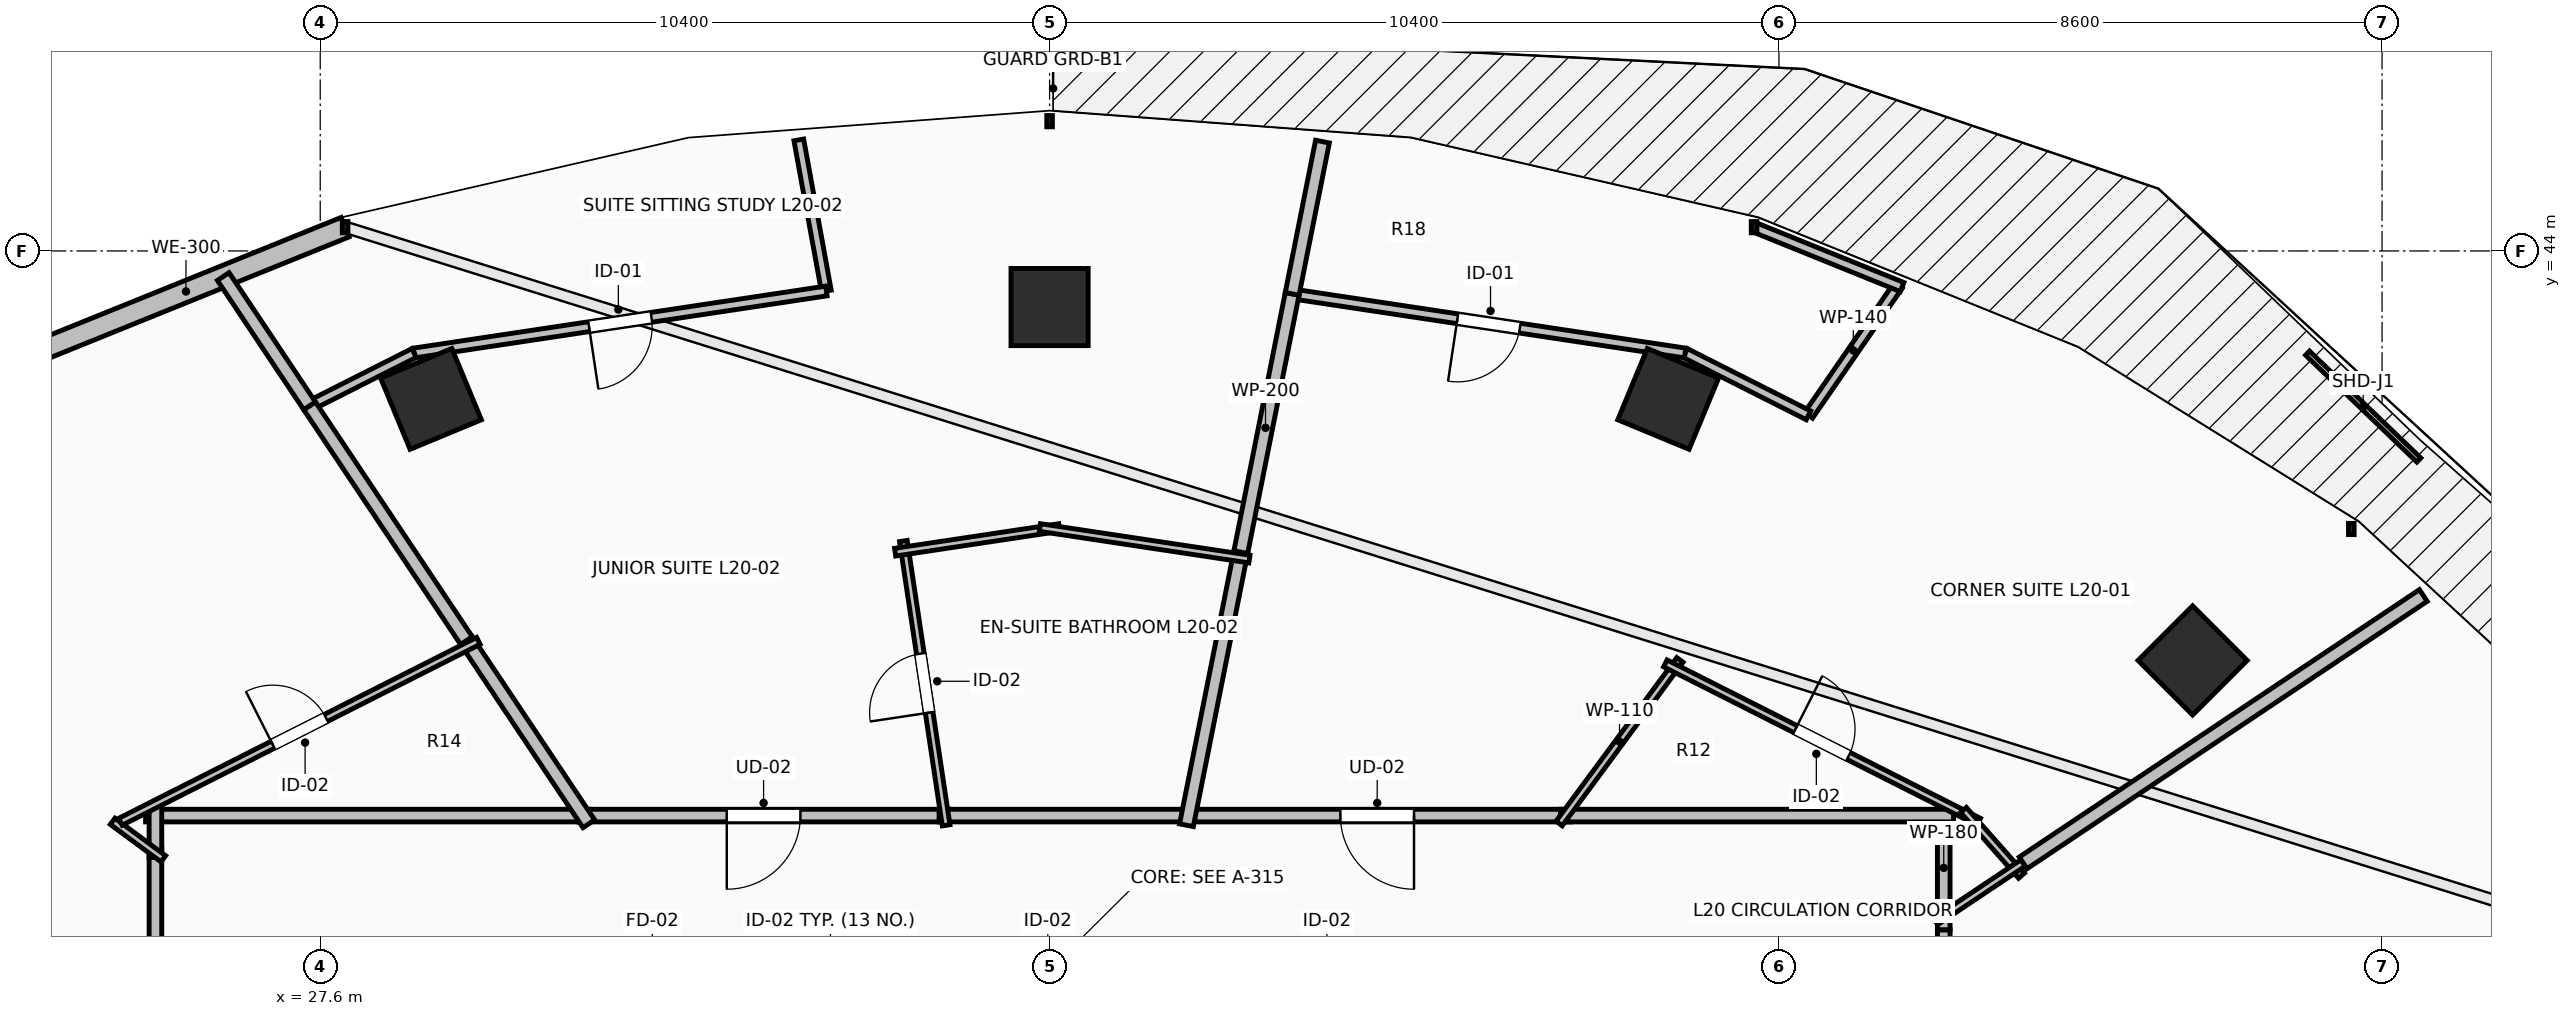
"""IFC4 building model, lengths in metres.
Left out: names, types, materials, properties, quantities, classifications, styles, units other than length and angle.
Written with IfcOpenShell. Run it as: python <this file> out.ifc"""

import sys

from ifc_helpers import new_model, si_unit, direction, frame, frame_2d, origin, origin_2d, place, context, subcontext, project, spatial, rectangle, extrude, element, fill, save


model = new_model("IFC4")
c1 = context("Model", 3, precision=1e-05, world=origin(), true_north=direction((0.0, 1.0)))
c2 = subcontext(c1, "Body", "Model", "MODEL_VIEW")
j1 = project(units=[si_unit("LENGTHUNIT", "METRE"), si_unit("PLANEANGLEUNIT", "RADIAN")], contexts=[c1])
p1 = place(None, origin())
s1 = spatial("IfcSite", under=j1, at=p1, CompositionType="ELEMENT")
p2 = place(p1, origin())
s2 = spatial("IfcBuilding", under=s1, at=p2, CompositionType="ELEMENT")
p3 = place(p2, frame((0.0, 0.0, 78.8)))
s3 = spatial("IfcBuildingStorey", under=s2, at=p3, CompositionType="ELEMENT", Elevation=78.8)
for number, where, z_axis, x_axis in (
    (1, (54.299, 38.162, 0.0), (0.0, 0.0, 1.0), (0.707, 0.707, 0.0)),
    (2, (46.821, 41.891, 0.0), (0.0, 0.0, 1.0), (0.383, 0.924, 0.0)),
    (3, (38.0, 43.2, 0.0), (0.0, 0.0, 1.0), (0.0, 1.0, 0.0)),
    (4, (29.179, 41.891, 0.0), (0.0, 0.0, 1.0), (-0.383, 0.924, 0.0)),
):
    element("IfcColumn", number, at=place(p3, frame(where, z_axis=z_axis, x_axis=x_axis)), inside=s3, PredefinedType="COLUMN", context=c2, shape_type="SweptSolid", body=[
        extrude(rectangle(XDim=1.1, YDim=1.1, at=origin_2d()), origin(), (0.0, 0.0, 1.0), 3.5),
    ])
p4 = place(p3, frame((27.955, 44.339, 0.0), z_axis=(0.0, 0.0, 1.0), x_axis=(-0.927122233109, -0.374759075775, 0.0)))
e5 = element("IfcWall", 5, at=p4, inside=s3, PredefinedType="STANDARD", context=c2, shape_type="SweptSolid", body=[
    extrude(rectangle(XDim=4.895, YDim=0.3, at=frame_2d((2.448, 0.0))), origin(), (0.0, 0.0, 1.0), 3.24),
])
p5 = place(p3, frame((45.424, 35.95, 0.0), z_axis=(0.0, 0.0, 1.0), x_axis=(-1.0, 0.0, 0.0)))
e6 = element("IfcWall", 6, at=p5, inside=s3, PredefinedType="PARTITIONING", context=c2, shape_type="SweptSolid", body=[
    extrude(rectangle(XDim=5.505, YDim=0.18, at=frame_2d((2.752, 0.0))), origin(), (0.0, 0.0, 1.0), 2.922),
])
p6 = place(p5, frame((2.228, 0.0, 0.0)))
e7 = element("IfcOpeningElement", 7, at=p6, cuts=e6, PredefinedType="OPENING", context=c2, shape_type="SweptSolid", body=[
    extrude(rectangle(XDim=1.05, YDim=2.2, at=frame_2d((0.525, 1.1))), frame((0.0, 0.105, 0.0), z_axis=(0.0, -1.0, 0.0), x_axis=(1.0, 0.0, 0.0)), (0.0, 0.0, 1.0), 0.21),
])
p7 = place(p3, frame((50.75, 34.319, 0.0), z_axis=(0.0, 0.0, 1.0), x_axis=(0.0, 1.0, 0.0)))
e8 = element("IfcWall", 8, at=p7, inside=s3, PredefinedType="PARTITIONING", context=c2, shape_type="SweptSolid", body=[
    extrude(rectangle(XDim=1.771, YDim=0.18, at=frame_2d((0.885, 0.0))), origin(), (0.0, 0.0, 1.0), 2.432),
])
p8 = place(p3, frame((50.89, 35.95, 0.0), z_axis=(0.0, 0.0, 1.0), x_axis=(-1.0, 0.0, 0.0)))
e9 = element("IfcWall", 9, at=p8, inside=s3, PredefinedType="PARTITIONING", context=c2, shape_type="SweptSolid", body=[
    extrude(rectangle(XDim=5.606, YDim=0.18, at=frame_2d((2.803, 0.0))), origin(), (0.0, 0.0, 1.0), 2.432),
])
p9 = place(p3, frame((36.564, 35.95, 0.0), z_axis=(0.0, 0.0, 1.0), x_axis=(-1.0, 0.0, 0.0)))
e10 = element("IfcWall", 10, at=p9, inside=s3, PredefinedType="PARTITIONING", context=c2, shape_type="SweptSolid", body=[
    extrude(rectangle(XDim=5.284, YDim=0.18, at=frame_2d((2.642, 0.0))), origin(), (0.0, 0.0, 1.0), 3.24),
])
p10 = place(p9, frame((2.117, 0.0, 0.0)))
e11 = element("IfcOpeningElement", 11, at=p10, cuts=e10, PredefinedType="OPENING", context=c2, shape_type="SweptSolid", body=[
    extrude(rectangle(XDim=1.05, YDim=2.2, at=frame_2d((0.525, 1.1))), frame((0.0, 0.105, 0.0), z_axis=(0.0, -1.0, 0.0), x_axis=(1.0, 0.0, 0.0)), (0.0, 0.0, 1.0), 0.21),
])
p11 = place(p3, frame((40.059, 35.95, 0.0), z_axis=(0.0, 0.0, 1.0), x_axis=(-1.0, 0.0, 0.0)))
e12 = element("IfcWall", 12, at=p11, inside=s3, PredefinedType="PARTITIONING", context=c2, shape_type="SweptSolid", body=[
    extrude(rectangle(XDim=3.635, YDim=0.18, at=frame_2d((1.817, 0.0))), origin(), (0.0, 0.0, 1.0), 3.24),
])
p12 = place(p3, frame((25.25, 35.492, 0.0), z_axis=(0.0, 0.0, 1.0), x_axis=(0.0, -1.0, 0.0)))
e13 = element("IfcWall", 13, at=p12, inside=s3, PredefinedType="PARTITIONING", context=c2, shape_type="SweptSolid", body=[
    extrude(rectangle(XDim=7.016, YDim=0.18, at=frame_2d((3.508, 0.0))), origin(), (0.0, 0.0, 1.0), 2.432),
])
p13 = place(p12, frame((2.983, 0.0, 0.0)))
e14 = element("IfcOpeningElement", 14, at=p13, cuts=e13, PredefinedType="OPENING", context=c2, shape_type="SweptSolid", body=[
    extrude(rectangle(XDim=1.05, YDim=2.2, at=frame_2d((0.525, 1.1))), frame((0.0, 0.105, 0.0), z_axis=(0.0, -1.0, 0.0), x_axis=(1.0, 0.0, 0.0)), (0.0, 0.0, 1.0), 0.21),
])
p14 = place(p3, frame((31.42, 35.95, 0.0), z_axis=(0.0, 0.0, 1.0), x_axis=(-1.0, 0.0, 0.0)))
e15 = element("IfcWall", 15, at=p14, inside=s3, PredefinedType="PARTITIONING", context=c2, shape_type="SweptSolid", body=[
    extrude(rectangle(XDim=6.31, YDim=0.18, at=frame_2d((3.155, 0.0))), origin(), (0.0, 0.0, 1.0), 2.432),
])
p15 = place(p3, frame((25.25, 36.09, 0.0), z_axis=(0.0, 0.0, 1.0), x_axis=(0.0, -1.0, 0.0)))
e16 = element("IfcWall", 16, at=p15, inside=s3, PredefinedType="PARTITIONING", context=c2, shape_type="SweptSolid", body=[
    extrude(rectangle(XDim=0.738, YDim=0.18, at=frame_2d((0.369, 0.0))), origin(), (0.0, 0.0, 1.0), 3.24),
])
p16 = place(p3, frame((50.75, 20.779, 0.0), z_axis=(0.0, 0.0, 1.0), x_axis=(0.0, 1.0, 0.0)))
e17 = element("IfcWall", 17, at=p16, inside=s3, PredefinedType="PARTITIONING", context=c2, shape_type="SweptSolid", body=[
    extrude(rectangle(XDim=13.54, YDim=0.18, at=frame_2d((6.77, 0.0))), origin(), (0.0, 0.0, 1.0), 2.432),
])
p17 = place(p16, frame((6.27, 0.0, 0.0)))
e18 = element("IfcOpeningElement", 18, at=p17, cuts=e17, PredefinedType="OPENING", context=c2, shape_type="SweptSolid", body=[
    extrude(rectangle(XDim=1.0, YDim=2.15, at=frame_2d((0.5, 1.075))), frame((0.0, 0.105, 0.0), z_axis=(0.0, -1.0, 0.0), x_axis=(1.0, 0.0, 0.0)), (0.0, 0.0, 1.0), 0.21),
])
p18 = place(p3, frame((45.266, 35.837, 0.0), z_axis=(0.0, 0.0, 1.0), x_axis=(0.594069015324, 0.804414075605, 0.0)))
e19 = element("IfcWall", 19, at=p18, inside=s3, PredefinedType="PARTITIONING", context=c2, shape_type="SweptSolid", body=[
    extrude(rectangle(XDim=2.899, YDim=0.11, at=frame_2d((1.45, 0.0))), origin(), (0.0, 0.0, 1.0), 2.922),
])
p19 = place(p3, frame((46.78, 38.12, 0.0), z_axis=(0.0, 0.0, 1.0), x_axis=(0.892517538434, -0.451012686726, 0.0)))
e20 = element("IfcWall", 20, at=p19, inside=s3, PredefinedType="PARTITIONING", context=c2, shape_type="SweptSolid", body=[
    extrude(rectangle(XDim=5.007, YDim=0.11, at=frame_2d((2.503, 0.0))), origin(), (0.0, 0.0, 1.0), 2.432),
])
p20 = place(p19, frame((2.079, 0.0, 0.0)))
e21 = element("IfcOpeningElement", 21, at=p20, cuts=e20, PredefinedType="OPENING", context=c2, shape_type="SweptSolid", body=[
    extrude(rectangle(XDim=0.85, YDim=2.1, at=frame_2d((0.425, 1.05))), frame((0.0, 0.07, 0.0), z_axis=(0.0, -1.0, 0.0), x_axis=(1.0, 0.0, 0.0)), (0.0, 0.0, 1.0), 0.14),
])
p21 = place(p3, frame((51.031, 36.03, 0.0), z_axis=(0.0, 0.0, 1.0), x_axis=(0.661996266618, -0.749507133377, 0.0)))
e22 = element("IfcWall", 22, at=p21, inside=s3, PredefinedType="PARTITIONING", context=c2, shape_type="SweptSolid", body=[
    extrude(rectangle(XDim=1.25, YDim=0.11, at=frame_2d((0.625, 0.0))), origin(), (0.0, 0.0, 1.0), 2.432),
])
p22 = place(p3, frame((51.882, 35.276, 0.0), z_axis=(0.0, 0.0, 1.0), x_axis=(-0.831374526136, -0.555712513169, 0.0)))
e23 = element("IfcWall", 23, at=p22, inside=s3, PredefinedType="PARTITIONING", context=c2, shape_type="SweptSolid", body=[
    extrude(rectangle(XDim=1.502, YDim=0.11, at=frame_2d((0.751, 0.0))), origin(), (0.0, 0.0, 1.0), 2.922),
])
p23 = place(p3, frame((50.1, 43.507, 0.0), z_axis=(0.0, 0.0, 1.0), x_axis=(-0.568470595976, -0.822703580587, 0.0)))
e24 = element("IfcWall", 24, at=p23, inside=s3, PredefinedType="PARTITIONING", context=c2, shape_type="SweptSolid", body=[
    extrude(rectangle(XDim=2.25, YDim=0.14, at=frame_2d((1.125, 0.0))), origin(), (0.0, 0.0, 1.0), 3.24),
])
p24 = place(p3, frame((48.821, 41.656, 0.0), z_axis=(0.0, 0.0, 1.0), x_axis=(-0.892511395612, 0.451024842668, 0.0)))
e25 = element("IfcWall", 25, at=p24, inside=s3, PredefinedType="PARTITIONING", context=c2, shape_type="SweptSolid", body=[
    extrude(rectangle(XDim=1.971, YDim=0.14, at=frame_2d((0.985, 0.0))), origin(), (0.0, 0.0, 1.0), 3.24),
])
p25 = place(p3, frame((47.062, 42.545, 0.0), z_axis=(0.0, 0.0, 1.0), x_axis=(-0.988869883596, 0.148782906669, 0.0)))
e26 = element("IfcWall", 26, at=p25, inside=s3, PredefinedType="PARTITIONING", context=c2, shape_type="SweptSolid", body=[
    extrude(rectangle(XDim=5.666, YDim=0.14, at=frame_2d((2.833, 0.0))), origin(), (0.0, 0.0, 1.0), 3.24),
])
p26 = place(p25, frame((2.383, 0.0, 0.0)))
e27 = element("IfcOpeningElement", 27, at=p26, cuts=e26, PredefinedType="OPENING", context=c2, shape_type="SweptSolid", body=[
    extrude(rectangle(XDim=0.9, YDim=2.1, at=frame_2d((0.45, 1.05))), frame((0.0, 0.085, 0.0), z_axis=(0.0, -1.0, 0.0), x_axis=(1.0, 0.0, 0.0)), (0.0, 0.0, 1.0), 0.17),
])
p27 = place(p3, frame((50.156, 43.485, 0.0), z_axis=(0.0, 0.0, 1.0), x_axis=(-0.926988791776, 0.375089029327, 0.0)))
e28 = element("IfcWall", 28, at=p27, inside=s3, PredefinedType="PARTITIONING", context=c2, shape_type="SweptSolid", body=[
    extrude(rectangle(XDim=2.263, YDim=0.14, at=frame_2d((1.132, 0.0))), origin(), (0.0, 0.0, 1.0), 3.24),
])
p28 = place(p3, frame((41.459, 43.388, 0.0), z_axis=(0.0, 0.0, 1.0), x_axis=(-0.195187593062, -0.980765926975, 0.0)))
e29 = element("IfcWall", 29, at=p28, inside=s3, PredefinedType="PARTITIONING", context=c2, shape_type="SweptSolid", body=[
    extrude(rectangle(XDim=3.894, YDim=0.2, at=frame_2d((1.947, 0.0))), origin(), (0.0, 0.0, 1.0), 2.677),
])
p29 = place(p3, frame((40.727, 39.706, 0.0), z_axis=(0.0, 0.0, 1.0), x_axis=(-0.195252736913, -0.980752960091, 0.0)))
e30 = element("IfcWall", 30, at=p29, inside=s3, PredefinedType="PARTITIONING", context=c2, shape_type="SweptSolid", body=[
    extrude(rectangle(XDim=3.97, YDim=0.2, at=frame_2d((1.985, 0.0))), origin(), (0.0, 0.0, 1.0), 2.874),
])
p30 = place(p3, frame((51.883, 35.276, 0.0), z_axis=(0.0, 0.0, 1.0), x_axis=(0.831464132421, 0.555578434154, 0.0)))
e31 = element("IfcWall", 31, at=p30, inside=s3, PredefinedType="PARTITIONING", context=c2, shape_type="SweptSolid", body=[
    extrude(rectangle(XDim=6.862, YDim=0.2, at=frame_2d((3.431, 0.0))), origin(), (0.0, 0.0, 1.0), 2.677),
])
p31 = place(p3, frame((41.891, 45.559, 0.0), z_axis=(0.0, 0.0, 1.0), x_axis=(-0.195204079936, -0.980762645688, 0.0)))
e32 = element("IfcWall", 32, at=p31, inside=s3, PredefinedType="PARTITIONING", context=c2, shape_type="SweptSolid", body=[
    extrude(rectangle(XDim=2.214, YDim=0.2, at=frame_2d((1.107, 0.0))), origin(), (0.0, 0.0, 1.0), 3.24),
])
p32 = place(p3, frame((36.525, 35.812, 0.0), z_axis=(0.0, 0.0, 1.0), x_axis=(-0.148739497936, 0.988876413792, 0.0)))
e33 = element("IfcWall", 33, at=p32, inside=s3, PredefinedType="PARTITIONING", context=c2, shape_type="SweptSolid", body=[
    extrude(rectangle(XDim=4.099, YDim=0.11, at=frame_2d((2.049, 0.0))), origin(), (0.0, 0.0, 1.0), 2.874),
])
p33 = place(p32, frame((1.624, 0.0, 0.0)))
e34 = element("IfcOpeningElement", 34, at=p33, cuts=e33, PredefinedType="OPENING", context=c2, shape_type="SweptSolid", body=[
    extrude(rectangle(XDim=0.85, YDim=2.1, at=frame_2d((0.425, 1.05))), frame((0.0, 0.07, 0.0), z_axis=(0.0, -1.0, 0.0), x_axis=(1.0, 0.0, 0.0)), (0.0, 0.0, 1.0), 0.14),
])
p34 = place(p3, frame((35.798, 39.705, 0.0), z_axis=(0.0, 0.0, 1.0), x_axis=(0.988893947493, 0.148622880511, 0.0)))
e35 = element("IfcWall", 35, at=p34, inside=s3, PredefinedType="PARTITIONING", context=c2, shape_type="SweptSolid", body=[
    extrude(rectangle(XDim=2.367, YDim=0.11, at=frame_2d((1.184, 0.0))), origin(), (0.0, 0.0, 1.0), 2.874),
])
p35 = place(p3, frame((37.862, 40.057, 0.0), z_axis=(0.0, 0.0, 1.0), x_axis=(0.988861549405, -0.148838288446, 0.0)))
e36 = element("IfcWall", 36, at=p35, inside=s3, PredefinedType="PARTITIONING", context=c2, shape_type="SweptSolid", body=[
    extrude(rectangle(XDim=3.021, YDim=0.11, at=frame_2d((1.511, 0.0))), origin(), (0.0, 0.0, 1.0), 3.24),
])
p36 = place(p3, frame((34.424, 45.583, 0.0), z_axis=(0.0, 0.0, 1.0), x_axis=(0.179405454878, -0.983775219631, 0.0)))
e37 = element("IfcWall", 37, at=p36, inside=s3, PredefinedType="PARTITIONING", context=c2, shape_type="SweptSolid", body=[
    extrude(rectangle(XDim=2.19, YDim=0.14, at=frame_2d((1.095, 0.0))), origin(), (0.0, 0.0, 1.0), 3.24),
])
p37 = place(p3, frame((34.817, 43.429, 0.0), z_axis=(0.0, 0.0, 1.0), x_axis=(-0.988882066939, -0.14870190882, 0.0)))
e38 = element("IfcWall", 38, at=p37, inside=s3, PredefinedType="PARTITIONING", context=c2, shape_type="SweptSolid", body=[
    extrude(rectangle(XDim=5.945, YDim=0.14, at=frame_2d((2.973, 0.0))), origin(), (0.0, 0.0, 1.0), 3.24),
])
p38 = place(p37, frame((2.522, 0.0, 0.0)))
e39 = element("IfcOpeningElement", 39, at=p38, cuts=e38, PredefinedType="OPENING", context=c2, shape_type="SweptSolid", body=[
    extrude(rectangle(XDim=0.9, YDim=2.1, at=frame_2d((0.45, 1.05))), frame((0.0, 0.085, 0.0), z_axis=(0.0, -1.0, 0.0), x_axis=(1.0, 0.0, 0.0)), (0.0, 0.0, 1.0), 0.17),
])
p39 = place(p3, frame((28.938, 42.545, 0.0), z_axis=(0.0, 0.0, 1.0), x_axis=(-0.892517956507, -0.451011859392, 0.0)))
e40 = element("IfcWall", 40, at=p39, inside=s3, PredefinedType="PARTITIONING", context=c2, shape_type="SweptSolid", body=[
    extrude(rectangle(XDim=1.669, YDim=0.14, at=frame_2d((0.835, 0.0))), origin(), (0.0, 0.0, 1.0), 3.24),
])
p40 = place(p3, frame((27.448, 41.792, 0.0), z_axis=(0.0, 0.0, 1.0), x_axis=(0.555619383998, -0.831436768567, 0.0)))
e41 = element("IfcWall", 41, at=p40, inside=s3, PredefinedType="PARTITIONING", context=c2, shape_type="SweptSolid", body=[
    extrude(rectangle(XDim=4.167, YDim=0.2, at=frame_2d((2.083, 0.0))), origin(), (0.0, 0.0, 1.0), 2.432),
])
p41 = place(p3, frame((29.685, 38.444, 0.0), z_axis=(0.0, 0.0, 1.0), x_axis=(0.555596981897, -0.831451738652, 0.0)))
e42 = element("IfcWall", 42, at=p41, inside=s3, PredefinedType="PARTITIONING", context=c2, shape_type="SweptSolid", body=[
    extrude(rectangle(XDim=3.14, YDim=0.2, at=frame_2d((1.57, 0.0))), origin(), (0.0, 0.0, 1.0), 2.432),
])
p42 = place(p3, frame((26.217, 43.635, 0.0), z_axis=(0.0, 0.0, 1.0), x_axis=(0.555411777185, -0.831575467269, 0.0)))
e43 = element("IfcWall", 43, at=p42, inside=s3, PredefinedType="PARTITIONING", context=c2, shape_type="SweptSolid", body=[
    extrude(rectangle(XDim=2.216, YDim=0.2, at=frame_2d((1.108, 0.0))), origin(), (0.0, 0.0, 1.0), 3.24),
])
p43 = place(p3, frame((25.363, 35.334, 0.0), z_axis=(0.0, 0.0, 1.0), x_axis=(-0.804215638238, 0.594337620561, 0.0)))
e44 = element("IfcWall", 44, at=p43, inside=s3, PredefinedType="PARTITIONING", context=c2, shape_type="SweptSolid", body=[
    extrude(rectangle(XDim=0.899, YDim=0.11, at=frame_2d((0.45, 0.0))), origin(), (0.0, 0.0, 1.0), 2.432),
])
p44 = place(p3, frame((24.751, 35.862, 0.0), z_axis=(0.0, 0.0, 1.0), x_axis=(0.892506436774, 0.451034655339, 0.0)))
e45 = element("IfcWall", 45, at=p44, inside=s3, PredefinedType="PARTITIONING", context=c2, shape_type="SweptSolid", body=[
    extrude(rectangle(XDim=5.719, YDim=0.11, at=frame_2d((2.859, 0.0))), origin(), (0.0, 0.0, 1.0), 2.432),
])
p45 = place(p44, frame((2.434, 0.0, 0.0)))
e46 = element("IfcOpeningElement", 46, at=p45, cuts=e45, PredefinedType="OPENING", context=c2, shape_type="SweptSolid", body=[
    extrude(rectangle(XDim=0.85, YDim=2.1, at=frame_2d((0.425, 1.05))), frame((0.0, 0.07, 0.0), z_axis=(0.0, -1.0, 0.0), x_axis=(1.0, 0.0, 0.0)), (0.0, 0.0, 1.0), 0.14),
])
p46 = place(p6, origin())
e47 = element("IfcDoor", 47, at=p46, inside=s3, OperationType="SINGLE_SWING_LEFT", PredefinedType="DOOR", context=c2, shape_type="SweptSolid", body=[
    extrude(rectangle(XDim=1.05, YDim=2.2, at=frame_2d((0.525, 1.1))), frame((0.0, 0.025, 0.0), z_axis=(0.0, -1.0, 0.0), x_axis=(1.0, 0.0, 0.0)), (0.0, 0.0, 1.0), 0.05),
])
fill(e7, e47)
p47 = place(p10, origin())
e48 = element("IfcDoor", 48, at=p47, inside=s3, OperationType="SINGLE_SWING_RIGHT", PredefinedType="DOOR", context=c2, shape_type="SweptSolid", body=[
    extrude(rectangle(XDim=1.05, YDim=2.2, at=frame_2d((0.525, 1.1))), frame((0.0, 0.025, 0.0), z_axis=(0.0, -1.0, 0.0), x_axis=(1.0, 0.0, 0.0)), (0.0, 0.0, 1.0), 0.05),
])
fill(e11, e48)
p48 = place(p20, origin())
e49 = element("IfcDoor", 49, at=p48, inside=s3, OperationType="SINGLE_SWING_LEFT", PredefinedType="DOOR", context=c2, shape_type="SweptSolid", body=[
    extrude(rectangle(XDim=0.85, YDim=2.1, at=frame_2d((0.425, 1.05))), frame((0.0, 0.025, 0.0), z_axis=(0.0, -1.0, 0.0), x_axis=(1.0, 0.0, 0.0)), (0.0, 0.0, 1.0), 0.05),
])
fill(e21, e49)
p49 = place(p26, origin())
e50 = element("IfcDoor", 50, at=p49, inside=s3, OperationType="SINGLE_SWING_RIGHT", PredefinedType="DOOR", context=c2, shape_type="SweptSolid", body=[
    extrude(rectangle(XDim=0.9, YDim=2.1, at=frame_2d((0.45, 1.05))), frame((0.0, 0.025, 0.0), z_axis=(0.0, -1.0, 0.0), x_axis=(1.0, 0.0, 0.0)), (0.0, 0.0, 1.0), 0.05),
])
fill(e27, e50)
p50 = place(p33, origin())
e51 = element("IfcDoor", 51, at=p50, inside=s3, OperationType="SINGLE_SWING_LEFT", PredefinedType="DOOR", context=c2, shape_type="SweptSolid", body=[
    extrude(rectangle(XDim=0.85, YDim=2.1, at=frame_2d((0.425, 1.05))), frame((0.0, 0.025, 0.0), z_axis=(0.0, -1.0, 0.0), x_axis=(1.0, 0.0, 0.0)), (0.0, 0.0, 1.0), 0.05),
])
fill(e34, e51)
p51 = place(p38, origin())
e52 = element("IfcDoor", 52, at=p51, inside=s3, OperationType="SINGLE_SWING_RIGHT", PredefinedType="DOOR", context=c2, shape_type="SweptSolid", body=[
    extrude(rectangle(XDim=0.9, YDim=2.1, at=frame_2d((0.45, 1.05))), frame((0.0, 0.025, 0.0), z_axis=(0.0, -1.0, 0.0), x_axis=(1.0, 0.0, 0.0)), (0.0, 0.0, 1.0), 0.05),
])
fill(e39, e52)
p52 = place(p45, origin())
e53 = element("IfcDoor", 53, at=p52, inside=s3, OperationType="SINGLE_SWING_LEFT", PredefinedType="DOOR", context=c2, shape_type="SweptSolid", body=[
    extrude(rectangle(XDim=0.85, YDim=2.1, at=frame_2d((0.425, 1.05))), frame((0.0, 0.025, 0.0), z_axis=(0.0, -1.0, 0.0), x_axis=(1.0, 0.0, 0.0)), (0.0, 0.0, 1.0), 0.05),
])
fill(e46, e53)
save(model, sys.argv[1])
